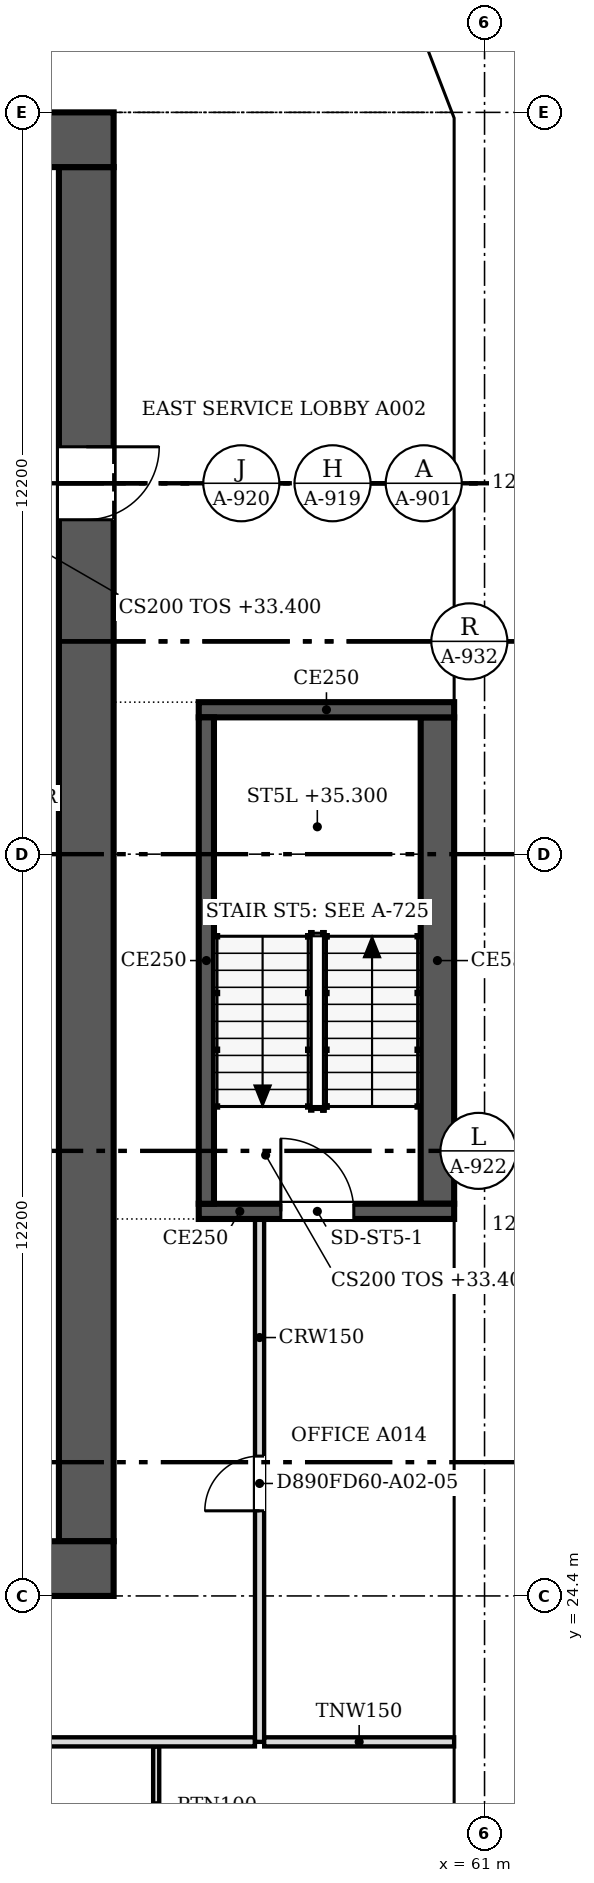
"""IFC4 building model, lengths in metres.
Left out: names, types, materials, properties, quantities, classifications, styles, units other than length and angle.
Written with IfcOpenShell. Run it as: python <this file> out.ifc"""

import sys

from ifc_helpers import new_model, si_unit, direction, frame, frame_2d, origin, place, context, subcontext, project, spatial, polyline, rectangle, outline, extrude, faceted_brep, source, transform, mapped, element, fill, save


model = new_model("IFC4")
c1 = context("Model", 3, precision=1e-05, world=origin(), true_north=direction((0.0, 1.0)))
c2 = subcontext(c1, "Body", "Model", "MODEL_VIEW")
j1 = project(units=[si_unit("LENGTHUNIT", "METRE"), si_unit("PLANEANGLEUNIT", "RADIAN")], contexts=[c1])
p1 = place(None, origin())
s1 = spatial("IfcSite", under=j1, at=p1, CompositionType="ELEMENT")
p2 = place(p1, origin())
s2 = spatial("IfcBuilding", under=s1, at=p2, CompositionType="ELEMENT")
p3 = place(p2, frame((0.0, 0.0, 33.4)))
s3 = spatial("IfcBuildingStorey", under=s2, at=p3, CompositionType="ELEMENT", Elevation=33.4)
m1 = source(origin(), c2, "Body", "Brep", [
    faceted_brep([(3.05, -0.25, 0.0), (6.1, -0.25, 3.8), (6.1, -0.25, 3.8), (3.05, -0.25, 7.6), (0.0, -0.25, 3.8), (0.0, 0.25, 3.8), (3.05, 0.25, 7.6), (6.1, 0.25, 3.8), (6.1, 0.25, 3.8), (3.05, 0.25, 0.0)], [[[0, 1, 2, 3, 4]], [[5, 6, 7, 8, 9]], [[9, 8, 1, 0]], [[7, 6, 3, 2]], [[6, 5, 4, 3]], [[5, 9, 0, 4]], [[1, 8, 7, 2]]]),
])
p4 = place(p3, frame((60.75, 18.3, -3.8), z_axis=(0.0, 0.0, 1.0), x_axis=(0.0, 1.0, 0.0)))
e1 = element("IfcWall", 1, at=p4, inside=s3, PredefinedType="SOLIDWALL", context=c2, shape_type="MappedRepresentation", body=[
    mapped(m1, transform((0.0, 0.0, 0.0), scale=1.0)),
])
m2 = source(origin(), c2, "Body", "SweptSolid", [
    extrude(outline(polyline([(3.05, 0.399), (5.78, 3.8), (3.05, 7.2), (0.321, 3.8), (3.05, 0.399)])), frame((0.0, 0.26, 0.0), z_axis=(0.0, -1.0, 0.0), x_axis=(1.0, 0.0, 0.0)), (0.0, 0.0, 1.0), 0.52),
])
p5 = place(p4, origin())
e2 = element("IfcOpeningElement", 2, at=p5, cuts=e1, PredefinedType="OPENING", context=c2, shape_type="MappedRepresentation", body=[
    mapped(m2, transform((0.0, 0.0, 0.0), scale=1.0)),
])
m3 = source(origin(), c2, "Body", "SweptSolid", [
    extrude(outline(polyline([(3.05, 0.0), (6.1, 3.8), (3.05, 7.6), (0.0, 3.8), (3.05, 0.0)])), frame((0.0, 0.25, 0.0), z_axis=(0.0, -1.0, 0.0), x_axis=(1.0, 0.0, 0.0)), (0.0, 0.0, 1.0), 0.5),
])
p6 = place(p3, frame((60.75, 24.4, -3.8), z_axis=(0.0, 0.0, 1.0), x_axis=(0.0, 1.0, 0.0)))
e3 = element("IfcWall", 3, at=p6, inside=s3, PredefinedType="SOLIDWALL", context=c2, shape_type="MappedRepresentation", body=[
    mapped(m3, transform((0.0, 0.0, 0.0), scale=1.0)),
])
p7 = place(p6, origin())
e4 = element("IfcOpeningElement", 4, at=p7, cuts=e3, PredefinedType="OPENING", context=c2, shape_type="MappedRepresentation", body=[
    mapped(m2, transform((0.0, 0.0, 0.0), scale=1.0)),
])
p8 = place(p3, frame((60.75, 30.5, -3.8), z_axis=(0.0, 0.0, 1.0), x_axis=(0.0, 1.0, 0.0)))
e5 = element("IfcWall", 5, at=p8, inside=s3, PredefinedType="SOLIDWALL", context=c2, shape_type="MappedRepresentation", body=[
    mapped(m3, transform((0.0, 0.0, 0.0), scale=1.0)),
])
p9 = place(p8, origin())
e6 = element("IfcOpeningElement", 6, at=p9, cuts=e5, PredefinedType="OPENING", context=c2, shape_type="MappedRepresentation", body=[
    mapped(m2, transform((0.0, 0.0, 0.0), scale=1.0)),
])
p10 = place(p3, frame((60.75, 36.6, -3.8), z_axis=(0.0, 0.0, 1.0), x_axis=(0.0, 1.0, 0.0)))
e7 = element("IfcWall", 7, at=p10, inside=s3, PredefinedType="SOLIDWALL", context=c2, shape_type="MappedRepresentation", body=[
    mapped(m1, transform((0.0, 0.0, 0.0), scale=1.0)),
])
p11 = place(p10, origin())
e8 = element("IfcOpeningElement", 8, at=p11, cuts=e7, PredefinedType="OPENING", context=c2, shape_type="MappedRepresentation", body=[
    mapped(m2, transform((0.0, 0.0, 0.0), scale=1.0)),
])
m4 = source(origin(), c2, "Body", "Brep", [
    faceted_brep([(3.05, -0.25, 0.0), (6.053, -0.25, 3.8), (3.05, -0.25, 7.6), (0.0, -0.25, 3.8), (0.0, 0.25, 3.8), (3.05, 0.25, 7.6), (6.007, 0.25, 3.859), (6.007, 0.25, 3.741), (3.05, 0.25, 0.0), (6.053, 0.0, 3.8)], [[[0, 1, 2, 3]], [[4, 5, 6, 7, 8]], [[8, 7, 9, 1, 0]], [[6, 5, 2, 1, 9]], [[5, 4, 3, 2]], [[4, 8, 0, 3]], [[9, 7, 6]]]),
])
p12 = place(p3, frame((60.75, 42.7, -3.8), z_axis=(0.0, 0.0, 1.0), x_axis=(0.0, 1.0, 0.0)))
e9 = element("IfcWall", 9, at=p12, inside=s3, PredefinedType="SOLIDWALL", context=c2, shape_type="MappedRepresentation", body=[
    mapped(m4, transform((0.0, 0.0, 0.0), scale=1.0)),
])
m5 = source(origin(), c2, "Body", "SweptSolid", [
    extrude(outline(polyline([(3.049, 0.401), (5.735, 3.8), (3.049, 7.199), (0.321, 3.8), (3.049, 0.401)])), frame((0.0, 0.26, 0.0), z_axis=(0.0, -1.0, 0.0), x_axis=(1.0, 0.0, 0.0)), (0.0, 0.0, 1.0), 0.52),
])
p13 = place(p12, origin())
e10 = element("IfcOpeningElement", 10, at=p13, cuts=e9, PredefinedType="OPENING", context=c2, shape_type="MappedRepresentation", body=[
    mapped(m5, transform((0.0, 0.0, 0.0), scale=1.0)),
])
m6 = source(origin(), c2, "Body", "Brep", [
    faceted_brep([(2.95, -0.25, 0.0), (3.003, -0.25, 0.068), (3.003, -0.25, 7.531), (2.95, -0.25, 7.6), (0.0, -0.25, 3.8), (0.047, 0.25, 3.86), (2.898, 0.25, 7.532), (2.898, 0.25, 0.068), (0.047, 0.25, 3.74), (2.95, 0.0, 0.0), (2.95, 0.0, 7.6), (0.0, 0.0, 3.8)], [[[0, 1, 2, 3, 4]], [[5, 6, 7, 8]], [[1, 0, 9]], [[10, 3, 2]], [[6, 5, 11, 4, 3, 10]], [[8, 7, 9, 0, 4, 11]], [[8, 11, 5]], [[1, 9, 7, 6, 10, 2]]]),
])
p14 = place(p3, frame((60.75, 48.753, -3.8), z_axis=(0.0, 0.0, 1.0), x_axis=(-0.35992665181, 0.932980602862, 0.0)))
e11 = element("IfcWall", 11, at=p14, inside=s3, PredefinedType="SOLIDWALL", context=c2, shape_type="MappedRepresentation", body=[
    mapped(m6, transform((0.0, 0.0, 0.0), scale=1.0)),
])
m7 = source(origin(), c2, "Body", "SweptSolid", [
    extrude(outline(polyline([(2.75, 6.935), (0.316, 3.8), (2.75, 0.665), (2.75, 6.935)])), frame((0.0, 0.26, 0.0), z_axis=(0.0, -1.0, 0.0), x_axis=(1.0, 0.0, 0.0)), (0.0, 0.0, 1.0), 0.52),
])
p15 = place(p14, origin())
e12 = element("IfcOpeningElement", 12, at=p15, cuts=e11, PredefinedType="OPENING", context=c2, shape_type="MappedRepresentation", body=[
    mapped(m7, transform((0.0, 0.0, 0.0), scale=1.0)),
])
p16 = place(p2, frame((0.0, 0.0, 37.2)))
s4 = spatial("IfcBuildingStorey", under=s2, at=p16, CompositionType="ELEMENT", Elevation=37.2)
m8 = source(origin(), c2, "Body", "SweptSolid", [
    extrude(outline(polyline([(3.05, 0.0), (6.1, 3.8), (3.05, 7.6), (0.0, 3.8), (3.05, 0.0)])), frame((0.0, 0.25, 0.0), z_axis=(0.0, -1.0, 0.0), x_axis=(1.0, 0.0, 0.0)), (0.0, 0.0, 1.0), 0.5),
])
p17 = place(p16, frame((60.75, 15.25, -3.8), z_axis=(0.0, 0.0, 1.0), x_axis=(0.0, 1.0, 0.0)))
e13 = element("IfcWall", 13, at=p17, inside=s4, PredefinedType="SOLIDWALL", context=c2, shape_type="MappedRepresentation", body=[
    mapped(m8, transform((0.0, 0.0, 0.0), scale=1.0)),
])
m9 = source(origin(), c2, "Body", "SweptSolid", [
    extrude(outline(polyline([(3.05, 0.399), (5.78, 3.8), (3.05, 7.201), (0.321, 3.8), (3.05, 0.399)])), frame((0.0, 0.26, 0.0), z_axis=(0.0, -1.0, 0.0), x_axis=(1.0, 0.0, 0.0)), (0.0, 0.0, 1.0), 0.52),
])
p18 = place(p17, origin())
e14 = element("IfcOpeningElement", 14, at=p18, cuts=e13, PredefinedType="OPENING", context=c2, shape_type="MappedRepresentation", body=[
    mapped(m9, transform((0.0, 0.0, 0.0), scale=1.0)),
])
m10 = source(origin(), c2, "Body", "Brep", [
    faceted_brep([(3.05, -0.25, 0.0), (6.1, -0.25, 3.8), (6.1, -0.25, 3.8), (3.05, -0.25, 7.6), (0.0, -0.25, 3.8), (0.0, 0.25, 3.8), (3.05, 0.25, 7.6), (6.1, 0.25, 3.8), (6.1, 0.25, 3.8), (3.05, 0.25, 0.0)], [[[0, 1, 2, 3, 4]], [[5, 6, 7, 8, 9]], [[9, 8, 1, 0]], [[7, 6, 3, 2]], [[6, 5, 4, 3]], [[5, 9, 0, 4]], [[1, 8, 7, 2]]]),
])
p19 = place(p16, frame((60.75, 21.35, -3.8), z_axis=(0.0, 0.0, 1.0), x_axis=(0.0, 1.0, 0.0)))
e15 = element("IfcWall", 15, at=p19, inside=s4, PredefinedType="SOLIDWALL", context=c2, shape_type="MappedRepresentation", body=[
    mapped(m10, transform((0.0, 0.0, 0.0), scale=1.0)),
])
p20 = place(p19, origin())
e16 = element("IfcOpeningElement", 16, at=p20, cuts=e15, PredefinedType="OPENING", context=c2, shape_type="MappedRepresentation", body=[
    mapped(m9, transform((0.0, 0.0, 0.0), scale=1.0)),
])
p21 = place(p16, frame((60.75, 27.45, -3.8), z_axis=(0.0, 0.0, 1.0), x_axis=(0.0, 1.0, 0.0)))
e17 = element("IfcWall", 17, at=p21, inside=s4, PredefinedType="SOLIDWALL", context=c2, shape_type="MappedRepresentation", body=[
    mapped(m8, transform((0.0, 0.0, 0.0), scale=1.0)),
])
p22 = place(p21, origin())
e18 = element("IfcOpeningElement", 18, at=p22, cuts=e17, PredefinedType="OPENING", context=c2, shape_type="MappedRepresentation", body=[
    mapped(m9, transform((0.0, 0.0, 0.0), scale=1.0)),
])
p23 = place(p16, frame((60.75, 33.55, -3.8), z_axis=(0.0, 0.0, 1.0), x_axis=(0.0, 1.0, 0.0)))
e19 = element("IfcWall", 19, at=p23, inside=s4, PredefinedType="SOLIDWALL", context=c2, shape_type="MappedRepresentation", body=[
    mapped(m10, transform((0.0, 0.0, 0.0), scale=1.0)),
])
p24 = place(p23, origin())
e20 = element("IfcOpeningElement", 20, at=p24, cuts=e19, PredefinedType="OPENING", context=c2, shape_type="MappedRepresentation", body=[
    mapped(m9, transform((0.0, 0.0, 0.0), scale=1.0)),
])
p25 = place(p16, frame((60.75, 39.65, -3.8), z_axis=(0.0, 0.0, 1.0), x_axis=(0.0, 1.0, 0.0)))
e21 = element("IfcWall", 21, at=p25, inside=s4, PredefinedType="SOLIDWALL", context=c2, shape_type="MappedRepresentation", body=[
    mapped(m8, transform((0.0, 0.0, 0.0), scale=1.0)),
])
p26 = place(p25, origin())
e22 = element("IfcOpeningElement", 22, at=p26, cuts=e21, PredefinedType="OPENING", context=c2, shape_type="MappedRepresentation", body=[
    mapped(m9, transform((0.0, 0.0, 0.0), scale=1.0)),
])
m11 = source(origin(), c2, "Body", "Brep", [
    faceted_brep([(3.003, -0.25, 0.0), (3.05, -0.25, 0.06), (3.05, -0.25, 7.54), (3.003, -0.25, 7.6), (0.0, -0.25, 3.8), (0.0, 0.25, 3.8), (2.957, 0.25, 7.541), (2.957, 0.25, 0.059), (3.003, 0.0, 0.0), (3.003, 0.0, 7.6)], [[[0, 1, 2, 3, 4]], [[5, 6, 7]], [[1, 0, 8]], [[9, 3, 2]], [[6, 5, 4, 3, 9]], [[5, 7, 8, 0, 4]], [[1, 8, 7, 6, 9, 2]]]),
])
p27 = place(p16, frame((60.75, 45.75, -3.8), z_axis=(0.0, 0.0, 1.0), x_axis=(0.0, 1.0, 0.0)))
e23 = element("IfcWall", 23, at=p27, inside=s4, PredefinedType="SOLIDWALL", context=c2, shape_type="MappedRepresentation", body=[
    mapped(m11, transform((0.0, 0.0, 0.0), scale=1.0)),
])
m12 = source(origin(), c2, "Body", "SweptSolid", [
    extrude(outline(polyline([(2.803, 6.944), (0.319, 3.8), (2.803, 0.656), (2.803, 6.944)])), frame((0.0, 0.26, 0.0), z_axis=(0.0, -1.0, 0.0), x_axis=(1.0, 0.0, 0.0)), (0.0, 0.0, 1.0), 0.52),
])
p28 = place(p27, origin())
e24 = element("IfcOpeningElement", 24, at=p28, cuts=e23, PredefinedType="OPENING", context=c2, shape_type="MappedRepresentation", body=[
    mapped(m12, transform((0.0, 0.0, 0.0), scale=1.0)),
])
m13 = source(origin(), c2, "Body", "Brep", [
    faceted_brep([(0.047, -0.25, 0.0), (2.997, -0.25, 3.8), (0.047, -0.25, 7.6), (0.0, -0.25, 7.541), (0.0, -0.25, 0.059), (0.093, 0.25, 7.54), (2.944, 0.25, 3.868), (2.944, 0.25, 3.732), (0.093, 0.25, 0.06), (2.997, 0.0, 3.8), (0.047, 0.0, 0.0), (0.047, 0.0, 7.6)], [[[0, 1, 2, 3, 4]], [[5, 6, 7, 8]], [[8, 7, 9, 1, 0, 10]], [[6, 5, 11, 2, 1, 9]], [[3, 2, 11]], [[10, 0, 4]], [[8, 10, 4, 3, 11, 5]], [[9, 7, 6]]]),
])
p29 = place(p16, frame((60.767, 48.71, -3.8), z_axis=(0.0, 0.0, 1.0), x_axis=(-0.359901446078, 0.932990326376, 0.0)))
e25 = element("IfcWall", 25, at=p29, inside=s4, PredefinedType="SOLIDWALL", context=c2, shape_type="MappedRepresentation", body=[
    mapped(m13, transform((0.0, 0.0, 0.0), scale=1.0)),
])
m14 = source(origin(), c2, "Body", "SweptSolid", [
    extrude(outline(polyline([(0.247, 0.665), (2.681, 3.8), (0.247, 6.935), (0.247, 0.665)])), frame((0.0, 0.26, 0.0), z_axis=(0.0, -1.0, 0.0), x_axis=(1.0, 0.0, 0.0)), (0.0, 0.0, 1.0), 0.52),
])
p30 = place(p29, origin())
e26 = element("IfcOpeningElement", 26, at=p30, cuts=e25, PredefinedType="OPENING", context=c2, shape_type="MappedRepresentation", body=[
    mapped(m14, transform((0.0, 0.0, 0.0), scale=1.0)),
])
p31 = place(p3, frame((54.9, 24.85, 0.0), z_axis=(0.0, 0.0, 1.0), x_axis=(-1.0, 0.0, 0.0)))
e27 = element("IfcWall", 27, at=p31, inside=s3, PredefinedType="SHEAR", context=c2, shape_type="SweptSolid", body=[
    extrude(rectangle(XDim=24.4, YDim=0.9, at=frame_2d((12.2, 0.0))), origin(), (0.0, 0.0, 1.0), 3.8),
])
m15 = source(origin(), c2, "Body", "SweptSolid", [
    extrude(rectangle(XDim=1.2, YDim=2.1, at=frame_2d((0.6, 1.05))), frame((0.0, 0.46, 0.0), z_axis=(0.0, -1.0, 0.0), x_axis=(1.0, 0.0, 0.0)), (0.0, 0.0, 1.0), 0.92),
])
p32 = place(p31, frame((1.5, 0.0, 0.0)))
e28 = element("IfcOpeningElement", 28, at=p32, cuts=e27, PredefinedType="OPENING", context=c2, shape_type="MappedRepresentation", body=[
    mapped(m15, transform((0.0, 0.0, 0.0), scale=1.0)),
])
p33 = place(p3, frame((30.5, 48.35, 0.0), z_axis=(0.0, 0.0, 1.0), x_axis=(1.0, 0.0, 0.0)))
e29 = element("IfcWall", 29, at=p33, inside=s3, PredefinedType="SHEAR", context=c2, shape_type="SweptSolid", body=[
    extrude(rectangle(XDim=24.4, YDim=0.9, at=frame_2d((12.2, 0.0))), origin(), (0.0, 0.0, 1.0), 3.8),
])
p34 = place(p3, frame((54.45, 47.9, 0.0), z_axis=(0.0, 0.0, 1.0), x_axis=(0.0, -1.0, 0.0)))
e30 = element("IfcWall", 30, at=p34, inside=s3, PredefinedType="SHEAR", context=c2, shape_type="SweptSolid", body=[
    extrude(rectangle(XDim=22.6, YDim=0.9, at=frame_2d((11.3, 0.0))), origin(), (0.0, 0.0, 1.0), 3.8),
])
p35 = place(p34, frame((4.6, 0.0, 0.0)))
e31 = element("IfcOpeningElement", 31, at=p35, cuts=e30, PredefinedType="OPENING", context=c2, shape_type="MappedRepresentation", body=[
    mapped(m15, transform((0.0, 0.0, 0.0), scale=1.0)),
])
p36 = place(p3, frame((60.5, 30.725, 0.0), z_axis=(0.0, 0.0, 1.0), x_axis=(-1.0, 0.0, 0.0)))
e32 = element("IfcWall", 32, at=p36, inside=s3, PredefinedType="SOLIDWALL", context=c2, shape_type="SweptSolid", body=[
    extrude(rectangle(XDim=4.2, YDim=0.25, at=frame_2d((2.1, 0.0))), origin(), (0.0, 0.0, 1.0), 3.8),
])
m16 = source(origin(), c2, "Body", "SweptSolid", [
    extrude(rectangle(XDim=1.2, YDim=2.1, at=frame_2d((0.6, 1.05))), frame((0.0, 0.135, 0.0), z_axis=(0.0, -1.0, 0.0), x_axis=(1.0, 0.0, 0.0)), (0.0, 0.0, 1.0), 0.27),
])
p37 = place(p36, frame((1.65, 0.0, 0.0)))
e33 = element("IfcOpeningElement", 33, at=p37, cuts=e32, PredefinedType="OPENING", context=c2, shape_type="MappedRepresentation", body=[
    mapped(m16, transform((0.0, 0.0, 0.0), scale=1.0)),
])
p38 = place(p3, frame((56.425, 30.85, 0.0), z_axis=(0.0, 0.0, 1.0), x_axis=(0.0, 1.0, 0.0)))
e34 = element("IfcWall", 34, at=p38, inside=s3, PredefinedType="SOLIDWALL", context=c2, shape_type="SweptSolid", body=[
    extrude(rectangle(XDim=8.0, YDim=0.25, at=frame_2d((4.0, 0.0))), origin(), (0.0, 0.0, 1.0), 3.8),
])
p39 = place(p3, frame((56.3, 38.975, 0.0), z_axis=(0.0, 0.0, 1.0), x_axis=(1.0, 0.0, 0.0)))
e35 = element("IfcWall", 35, at=p39, inside=s3, PredefinedType="SOLIDWALL", context=c2, shape_type="SweptSolid", body=[
    extrude(rectangle(XDim=4.2, YDim=0.25, at=frame_2d((2.1, 0.0))), origin(), (0.0, 0.0, 1.0), 3.8),
])
p40 = place(p3, frame((60.225, 38.85, 0.0), z_axis=(0.0, 0.0, 1.0), x_axis=(0.0, -1.0, 0.0)))
e36 = element("IfcWall", 36, at=p40, inside=s3, PredefinedType="SOLIDWALL", context=c2, shape_type="SweptSolid", body=[
    extrude(rectangle(XDim=8.0, YDim=0.55, at=frame_2d((4.0, 0.0))), origin(), (0.0, 0.0, 1.0), 3.8),
])
p41 = place(p3, frame((55.6, 21.924, 0.0), z_axis=(0.0, 0.0, 1.0), x_axis=(0.0, -1.0, 0.0)))
e37 = element("IfcWall", 37, at=p41, inside=s3, PredefinedType="PARTITIONING", context=c2, shape_type="SweptSolid", body=[
    extrude(rectangle(XDim=4.748, YDim=0.1, at=frame_2d((2.374, 0.0))), origin(), (0.0, 0.0, 1.0), 3.067),
])
m17 = source(origin(), c2, "Body", "SweptSolid", [
    extrude(rectangle(XDim=0.9, YDim=2.1, at=frame_2d((0.45, 1.05))), frame((0.0, 0.06, 0.0), z_axis=(0.0, -1.0, 0.0), x_axis=(1.0, 0.0, 0.0)), (0.0, 0.0, 1.0), 0.12),
])
p42 = place(p41, frame((1.948, 0.0, 0.0)))
e38 = element("IfcOpeningElement", 38, at=p42, cuts=e37, PredefinedType="OPENING", context=c2, shape_type="MappedRepresentation", body=[
    mapped(m17, transform((0.0, 0.0, 0.0), scale=1.0)),
])
p43 = place(p3, frame((45.476, 22.0, 0.0), z_axis=(0.0, 0.0, 1.0), x_axis=(1.0, 0.0, 0.0)))
e39 = element("IfcWall", 39, at=p43, inside=s3, PredefinedType="PARTITIONING", context=c2, shape_type="SweptSolid", body=[
    extrude(rectangle(XDim=11.748, YDim=0.15, at=frame_2d((5.874, 0.0))), origin(), (0.0, 0.0, 1.0), 3.067),
])
p44 = place(p3, frame((57.3, 30.6, 0.0), z_axis=(0.0, 0.0, 1.0), x_axis=(0.0, -1.0, 0.0)))
e40 = element("IfcWall", 40, at=p44, inside=s3, PredefinedType="PARTITIONING", context=c2, shape_type="SweptSolid", body=[
    extrude(rectangle(XDim=8.6, YDim=0.15, at=frame_2d((4.3, 0.0))), origin(), (0.0, 0.0, 1.0), 3.067),
])
m18 = source(origin(), c2, "Body", "SweptSolid", [
    extrude(rectangle(XDim=0.9, YDim=2.1, at=frame_2d((0.45, 1.05))), frame((0.0, 0.085, 0.0), z_axis=(0.0, -1.0, 0.0), x_axis=(1.0, 0.0, 0.0)), (0.0, 0.0, 1.0), 0.17),
])
p45 = place(p44, frame((3.9, 0.0, 0.0)))
e41 = element("IfcOpeningElement", 41, at=p45, cuts=e40, PredefinedType="OPENING", context=c2, shape_type="MappedRepresentation", body=[
    mapped(m18, transform((0.0, 0.0, 0.0), scale=1.0)),
])
p46 = place(p3, frame((57.376, 22.0, 0.0), z_axis=(0.0, 0.0, 1.0), x_axis=(1.0, 0.0, 0.0)))
e42 = element("IfcWall", 42, at=p46, inside=s3, PredefinedType="PARTITIONING", context=c2, shape_type="SweptSolid", body=[
    extrude(rectangle(XDim=3.124, YDim=0.15, at=frame_2d((1.562, 0.0))), origin(), (0.0, 0.0, 1.0), 3.067),
])
m19 = source(origin(), c2, "Body", "SweptSolid", [
    extrude(rectangle(XDim=1.2, YDim=2.1, at=frame_2d((0.6, 1.05))), frame((0.0, 0.025, 0.0), z_axis=(0.0, -1.0, 0.0), x_axis=(1.0, 0.0, 0.0)), (0.0, 0.0, 1.0), 0.05),
])
p47 = place(p35, origin())
e43 = element("IfcDoor", 43, at=p47, inside=s3, OperationType="SINGLE_SWING_LEFT", PredefinedType="DOOR", context=c2, shape_type="MappedRepresentation", body=[
    mapped(m19, transform((0.0, 0.0, 0.0), scale=1.0)),
])
fill(e31, e43)
p48 = place(p37, origin())
e44 = element("IfcDoor", 44, at=p48, inside=s3, OperationType="SINGLE_SWING_RIGHT", PredefinedType="DOOR", context=c2, shape_type="MappedRepresentation", body=[
    mapped(m19, transform((0.0, 0.0, 0.0), scale=1.0)),
])
fill(e33, e44)
m20 = source(origin(), c2, "Body", "SweptSolid", [
    extrude(rectangle(XDim=0.9, YDim=2.1, at=frame_2d((0.45, 1.05))), frame((0.0, 0.025, 0.0), z_axis=(0.0, -1.0, 0.0), x_axis=(1.0, 0.0, 0.0)), (0.0, 0.0, 1.0), 0.05),
])
p49 = place(p45, origin())
e45 = element("IfcDoor", 45, at=p49, inside=s3, OperationType="SINGLE_SWING_RIGHT", PredefinedType="DOOR", context=c2, shape_type="MappedRepresentation", body=[
    mapped(m20, transform((0.0, 0.0, 0.0), scale=1.0)),
])
fill(e41, e45)
save(model, sys.argv[1])
